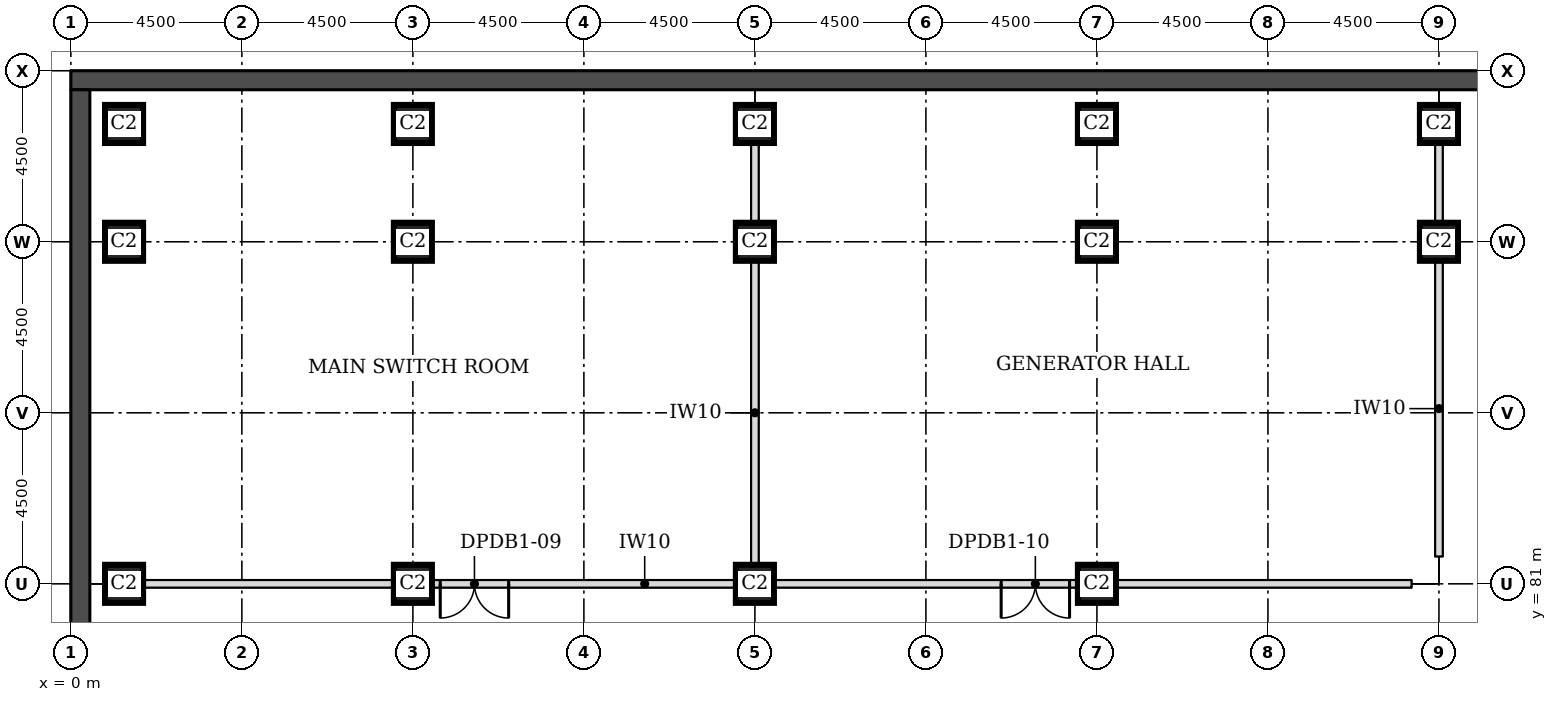
"""IFC4 building model, lengths in metres.
Left out: names, types, materials, properties, quantities, classifications, styles, units other than length and angle.
Written with IfcOpenShell. Run it as: python <this file> out.ifc"""

import sys

from ifc_helpers import new_model, si_unit, direction, frame, frame_2d, origin, origin_2d, place, context, subcontext, project, spatial, rectangle, extrude, element, fill, save


model = new_model("IFC4")
c1 = context("Model", 3, precision=1e-05, world=origin(), true_north=direction((0.0, 1.0)))
c2 = subcontext(c1, "Body", "Model", "MODEL_VIEW")
j1 = project(units=[si_unit("LENGTHUNIT", "METRE"), si_unit("PLANEANGLEUNIT", "RADIAN")], contexts=[c1])
p1 = place(None, origin())
s1 = spatial("IfcSite", under=j1, at=p1, CompositionType="ELEMENT")
p2 = place(p1, origin())
s2 = spatial("IfcBuilding", under=s1, at=p2, CompositionType="ELEMENT")
p3 = place(p2, frame((0.0, 0.0, -4.5)))
s3 = spatial("IfcBuildingStorey", under=s2, at=p3, CompositionType="ELEMENT", Elevation=-4.5)
p4 = place(p3, frame((0.0, 94.25, 0.0), z_axis=(0.0, 0.0, 1.0), x_axis=(1.0, 0.0, 0.0)))
e1 = element("IfcWall", 1, at=p4, inside=s3, PredefinedType="SOLIDWALL", context=c2, shape_type="SweptSolid", body=[
    extrude(rectangle(XDim=99.0, YDim=0.5, at=frame_2d((49.5, 0.0))), origin(), (0.0, 0.0, 1.0), 4.1),
])
p5 = place(p3, frame((0.25, 0.5, 0.0), z_axis=(0.0, 0.0, 1.0), x_axis=(0.0, 1.0, 0.0)))
e2 = element("IfcWall", 2, at=p5, inside=s3, PredefinedType="SOLIDWALL", context=c2, shape_type="SweptSolid", body=[
    extrude(rectangle(XDim=93.5, YDim=0.5, at=frame_2d((46.75, 0.0))), origin(), (0.0, 0.0, 1.0), 4.1),
])
for number, where, z_axis, x_axis in (
    (3, (9.0, 81.0, 0.0), (0.0, 0.0, 1.0), (1.0, 0.0, 0.0)),
    (4, (9.0, 90.0, 0.0), (0.0, 0.0, 1.0), (1.0, 0.0, 0.0)),
    (5, (18.0, 81.0, 0.0), (0.0, 0.0, 1.0), (1.0, 0.0, 0.0)),
    (6, (18.0, 90.0, 0.0), (0.0, 0.0, 1.0), (1.0, 0.0, 0.0)),
    (7, (27.0, 81.0, 0.0), (0.0, 0.0, 1.0), (1.0, 0.0, 0.0)),
    (8, (27.0, 90.0, 0.0), (0.0, 0.0, 1.0), (1.0, 0.0, 0.0)),
    (9, (36.0, 90.0, 0.0), (0.0, 0.0, 1.0), (1.0, 0.0, 0.0)),
    (10, (1.4, 81.0, 0.0), (0.0, 0.0, 1.0), (1.0, 0.0, 0.0)),
    (11, (1.4, 90.0, 0.0), (0.0, 0.0, 1.0), (1.0, 0.0, 0.0)),
    (12, (1.4, 93.1, 0.0), (0.0, 0.0, 1.0), (1.0, 0.0, 0.0)),
    (13, (9.0, 93.1, 0.0), (0.0, 0.0, 1.0), (1.0, 0.0, 0.0)),
    (14, (18.0, 93.1, 0.0), (0.0, 0.0, 1.0), (1.0, 0.0, 0.0)),
    (15, (27.0, 93.1, 0.0), (0.0, 0.0, 1.0), (1.0, 0.0, 0.0)),
    (16, (36.0, 93.1, 0.0), (0.0, 0.0, 1.0), (1.0, 0.0, 0.0)),
):
    element("IfcColumn", number, at=place(p3, frame(where, z_axis=z_axis, x_axis=x_axis)), inside=s3, PredefinedType="COLUMN", context=c2, shape_type="SweptSolid", body=[
        extrude(rectangle(XDim=1.0, YDim=1.0, at=origin_2d()), origin(), (0.0, 0.0, 1.0), 4.5),
    ])
p6 = place(p3, frame((1.9, 81.0, 0.0), z_axis=(0.0, 0.0, 1.0), x_axis=(1.0, 0.0, 0.0)))
e17 = element("IfcWall", 17, at=p6, inside=s3, PredefinedType="PARTITIONING", context=c2, shape_type="SweptSolid", body=[
    extrude(rectangle(XDim=6.6, YDim=0.2, at=frame_2d((3.3, 0.0))), origin(), (0.0, 0.0, 1.0), 4.1),
])
p7 = place(p3, frame((9.5, 81.0, 0.0), z_axis=(0.0, 0.0, 1.0), x_axis=(1.0, 0.0, 0.0)))
e18 = element("IfcWall", 18, at=p7, inside=s3, PredefinedType="PARTITIONING", context=c2, shape_type="SweptSolid", body=[
    extrude(rectangle(XDim=8.0, YDim=0.2, at=frame_2d((4.0, 0.0))), origin(), (0.0, 0.0, 1.0), 4.1),
])
p8 = place(p7, frame((0.22, 0.0, 0.0)))
e19 = element("IfcOpeningElement", 19, at=p8, cuts=e18, PredefinedType="OPENING", context=c2, shape_type="SweptSolid", body=[
    extrude(rectangle(XDim=1.8, YDim=2.1, at=frame_2d((0.9, 1.05))), frame((0.0, 0.11, 0.0), z_axis=(0.0, -1.0, 0.0), x_axis=(1.0, 0.0, 0.0)), (0.0, 0.0, 1.0), 0.22),
])
p9 = place(p3, frame((18.5, 81.0, 0.0), z_axis=(0.0, 0.0, 1.0), x_axis=(1.0, 0.0, 0.0)))
e20 = element("IfcWall", 20, at=p9, inside=s3, PredefinedType="PARTITIONING", context=c2, shape_type="SweptSolid", body=[
    extrude(rectangle(XDim=8.0, YDim=0.2, at=frame_2d((4.0, 0.0))), origin(), (0.0, 0.0, 1.0), 4.1),
])
p10 = place(p9, frame((5.98, 0.0, 0.0)))
e21 = element("IfcOpeningElement", 21, at=p10, cuts=e20, PredefinedType="OPENING", context=c2, shape_type="SweptSolid", body=[
    extrude(rectangle(XDim=1.8, YDim=2.1, at=frame_2d((0.9, 1.05))), frame((0.0, 0.11, 0.0), z_axis=(0.0, -1.0, 0.0), x_axis=(1.0, 0.0, 0.0)), (0.0, 0.0, 1.0), 0.22),
])
p11 = place(p3, frame((27.5, 81.0, 0.0), z_axis=(0.0, 0.0, 1.0), x_axis=(1.0, 0.0, 0.0)))
e22 = element("IfcWall", 22, at=p11, inside=s3, PredefinedType="PARTITIONING", context=c2, shape_type="SweptSolid", body=[
    extrude(rectangle(XDim=7.78, YDim=0.2, at=frame_2d((3.89, 0.0))), origin(), (0.0, 0.0, 1.0), 4.1),
])
p12 = place(p3, frame((18.0, 81.5, 0.0), z_axis=(0.0, 0.0, 1.0), x_axis=(0.0, 1.0, 0.0)))
e23 = element("IfcWall", 23, at=p12, inside=s3, PredefinedType="PARTITIONING", context=c2, shape_type="SweptSolid", body=[
    extrude(rectangle(XDim=8.0, YDim=0.2, at=frame_2d((4.0, 0.0))), origin(), (0.0, 0.0, 1.0), 4.1),
])
p13 = place(p3, frame((18.0, 90.5, 0.0), z_axis=(0.0, 0.0, 1.0), x_axis=(0.0, 1.0, 0.0)))
e24 = element("IfcWall", 24, at=p13, inside=s3, PredefinedType="PARTITIONING", context=c2, shape_type="SweptSolid", body=[
    extrude(rectangle(XDim=2.1, YDim=0.2, at=frame_2d((1.05, 0.0))), origin(), (0.0, 0.0, 1.0), 4.1),
])
p14 = place(p3, frame((36.0, 81.72, 0.0), z_axis=(0.0, 0.0, 1.0), x_axis=(0.0, 1.0, 0.0)))
e25 = element("IfcWall", 25, at=p14, inside=s3, PredefinedType="PARTITIONING", context=c2, shape_type="SweptSolid", body=[
    extrude(rectangle(XDim=7.78, YDim=0.2, at=frame_2d((3.89, 0.0))), origin(), (0.0, 0.0, 1.0), 4.1),
])
p15 = place(p3, frame((36.0, 90.5, 0.0), z_axis=(0.0, 0.0, 1.0), x_axis=(0.0, 1.0, 0.0)))
e26 = element("IfcWall", 26, at=p15, inside=s3, PredefinedType="PARTITIONING", context=c2, shape_type="SweptSolid", body=[
    extrude(rectangle(XDim=2.1, YDim=0.2, at=frame_2d((1.05, 0.0))), origin(), (0.0, 0.0, 1.0), 4.1),
])
p16 = place(p8, frame((1.8, 0.0, 0.0), z_axis=(0.0, 0.0, 1.0), x_axis=(-1.0, 0.0, 0.0)))
e27 = element("IfcDoor", 27, at=p16, inside=s3, OperationType="DOUBLE_DOOR_SINGLE_SWING", PredefinedType="DOOR", context=c2, shape_type="SweptSolid", body=[
    extrude(rectangle(XDim=1.8, YDim=2.1, at=frame_2d((0.9, 1.05))), frame((0.0, 0.025, 0.0), z_axis=(0.0, -1.0, 0.0), x_axis=(1.0, 0.0, 0.0)), (0.0, 0.0, 1.0), 0.05),
])
fill(e19, e27)
p17 = place(p10, frame((1.8, 0.0, 0.0), z_axis=(0.0, 0.0, 1.0), x_axis=(-1.0, 0.0, 0.0)))
e28 = element("IfcDoor", 28, at=p17, inside=s3, OperationType="DOUBLE_DOOR_SINGLE_SWING", PredefinedType="DOOR", context=c2, shape_type="SweptSolid", body=[
    extrude(rectangle(XDim=1.8, YDim=2.1, at=frame_2d((0.9, 1.05))), frame((0.0, 0.025, 0.0), z_axis=(0.0, -1.0, 0.0), x_axis=(1.0, 0.0, 0.0)), (0.0, 0.0, 1.0), 0.05),
])
fill(e21, e28)
save(model, sys.argv[1])
